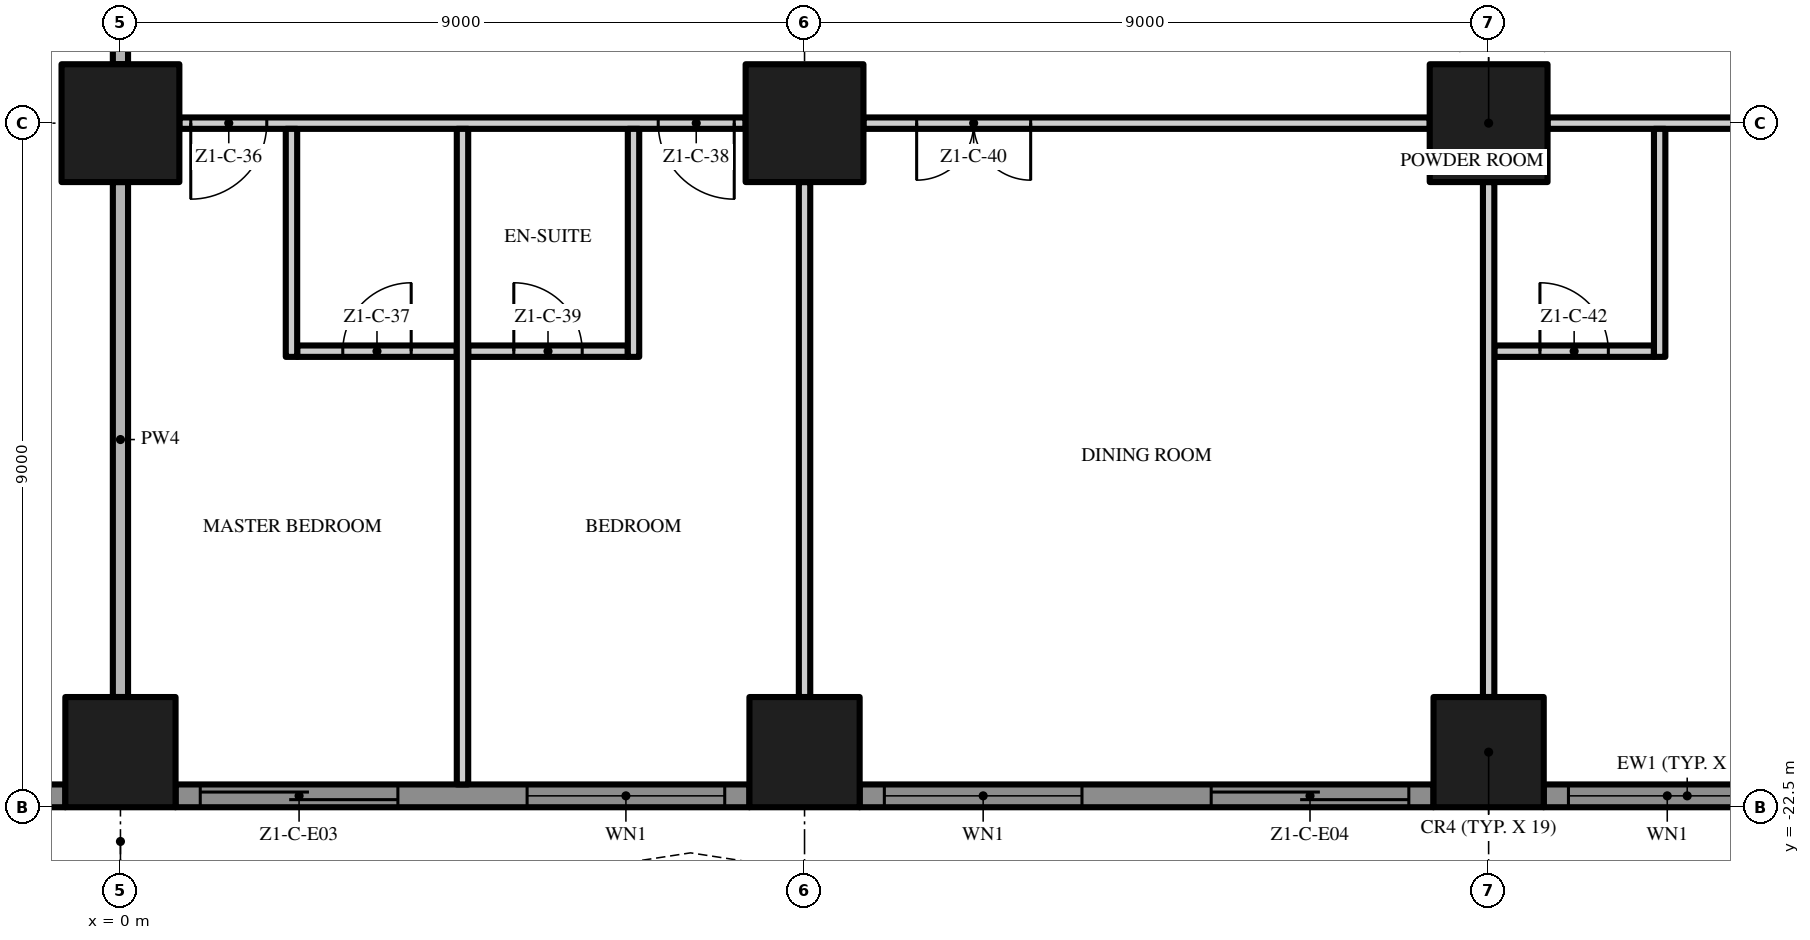
"""IFC4 building model, lengths in metres.
Left out: names, types, materials, properties, quantities, classifications, styles, units other than length and angle.
Written with IfcOpenShell. Run it as: python <this file> out.ifc"""

import sys

from ifc_helpers import new_model, si_unit, direction, frame, frame_2d, origin, origin_2d, place, context, subcontext, project, spatial, polyline, rectangle, outline, extrude, element, fill, save


model = new_model("IFC4")
c1 = context("Model", 3, precision=1e-05, world=origin(), true_north=direction((0.0, 1.0)))
c2 = subcontext(c1, "Body", "Model", "MODEL_VIEW")
j1 = project(units=[si_unit("LENGTHUNIT", "METRE"), si_unit("PLANEANGLEUNIT", "RADIAN")], contexts=[c1])
p1 = place(None, origin())
s1 = spatial("IfcSite", under=j1, at=p1, CompositionType="ELEMENT")
p2 = place(p1, origin())
s2 = spatial("IfcBuilding", under=s1, at=p2, CompositionType="ELEMENT")
p3 = place(p2, frame((0.0, 0.0, 37.8)))
s3 = spatial("IfcBuildingStorey", under=s2, at=p3, CompositionType="ELEMENT", Elevation=37.8)
p4 = place(p3, frame((0.0, -13.5, 0.0), z_axis=(0.0, 0.0, 1.0), x_axis=(1.0, 0.0, 0.0)))
e1 = element("IfcColumn", 1, at=p4, inside=s3, PredefinedType="COLUMN", context=c2, shape_type="SweptSolid", body=[
    extrude(rectangle(XDim=1.55, YDim=1.55, at=origin_2d()), origin(), (0.0, 0.0, 1.0), 3.5),
])
p5 = place(p3, frame((0.0, -21.775, 0.0), z_axis=(0.0, 0.0, 1.0), x_axis=(1.0, 0.0, 0.0)))
e2 = element("IfcColumn", 2, at=p5, inside=s3, PredefinedType="COLUMN", context=c2, shape_type="SweptSolid", body=[
    extrude(rectangle(XDim=1.45, YDim=1.45, at=origin_2d()), origin(), (0.0, 0.0, 1.0), 3.5),
])
p6 = place(p3, frame((18.0, -13.5, 0.0), z_axis=(0.0, 0.0, 1.0), x_axis=(1.0, 0.0, 0.0)))
e3 = element("IfcColumn", 3, at=p6, inside=s3, PredefinedType="COLUMN", context=c2, shape_type="SweptSolid", body=[
    extrude(rectangle(XDim=1.55, YDim=1.55, at=origin_2d()), origin(), (0.0, 0.0, 1.0), 3.5),
])
p7 = place(p3, frame((18.0, -21.775, 0.0), z_axis=(0.0, 0.0, 1.0), x_axis=(1.0, 0.0, 0.0)))
e4 = element("IfcColumn", 4, at=p7, inside=s3, PredefinedType="COLUMN", context=c2, shape_type="SweptSolid", body=[
    extrude(rectangle(XDim=1.45, YDim=1.45, at=origin_2d()), origin(), (0.0, 0.0, 1.0), 3.5),
])
p8 = place(p3, frame((9.0, -13.5, 0.0), z_axis=(0.0, 0.0, 1.0), x_axis=(1.0, 0.0, 0.0)))
e5 = element("IfcColumn", 5, at=p8, inside=s3, PredefinedType="COLUMN", context=c2, shape_type="SweptSolid", body=[
    extrude(rectangle(XDim=1.55, YDim=1.55, at=origin_2d()), origin(), (0.0, 0.0, 1.0), 3.5),
])
p9 = place(p3, frame((9.0, -21.775, 0.0), z_axis=(0.0, 0.0, 1.0), x_axis=(1.0, 0.0, 0.0)))
e6 = element("IfcColumn", 6, at=p9, inside=s3, PredefinedType="COLUMN", context=c2, shape_type="SweptSolid", body=[
    extrude(rectangle(XDim=1.45, YDim=1.45, at=origin_2d()), origin(), (0.0, 0.0, 1.0), 3.5),
])
p10 = place(p3, frame((-0.725, -22.35, 0.0), z_axis=(0.0, 0.0, 1.0), x_axis=(-1.0, 0.0, 0.0)))
e7 = element("IfcWall", 7, at=p10, inside=s3, PredefinedType="SOLIDWALL", context=c2, shape_type="SweptSolid", body=[
    extrude(rectangle(XDim=7.55, YDim=0.3, at=frame_2d((3.775, 0.0))), origin(), (0.0, 0.0, 1.0), 3.5),
])
p11 = place(p10, frame((4.625, 0.0, 0.45)))
e8 = element("IfcOpeningElement", 8, at=p11, cuts=e7, PredefinedType="OPENING", context=c2, shape_type="SweptSolid", body=[
    extrude(rectangle(XDim=2.6, YDim=2.65, at=frame_2d((1.3, 1.325))), frame((0.0, 0.16, 0.0), z_axis=(0.0, -1.0, 0.0), x_axis=(1.0, 0.0, 0.0)), (0.0, 0.0, 1.0), 0.32),
])
p12 = place(p10, frame((0.325, 0.0, 0.0)))
e9 = element("IfcOpeningElement", 9, at=p12, cuts=e7, PredefinedType="OPENING", context=c2, shape_type="SweptSolid", body=[
    extrude(rectangle(XDim=2.6, YDim=2.4, at=frame_2d((1.3, 1.2))), frame((0.0, 0.16, 0.0), z_axis=(0.0, -1.0, 0.0), x_axis=(1.0, 0.0, 0.0)), (0.0, 0.0, 1.0), 0.32),
])
p13 = place(p3, frame((8.275, -22.35, 0.0), z_axis=(0.0, 0.0, 1.0), x_axis=(-1.0, 0.0, 0.0)))
e10 = element("IfcWall", 10, at=p13, inside=s3, PredefinedType="SOLIDWALL", context=c2, shape_type="SweptSolid", body=[
    extrude(rectangle(XDim=7.55, YDim=0.3, at=frame_2d((3.775, 0.0))), origin(), (0.0, 0.0, 1.0), 3.5),
])
p14 = place(p13, frame((4.625, 0.0, 0.0)))
e11 = element("IfcOpeningElement", 11, at=p14, cuts=e10, PredefinedType="OPENING", context=c2, shape_type="SweptSolid", body=[
    extrude(rectangle(XDim=2.6, YDim=2.4, at=frame_2d((1.3, 1.2))), frame((0.0, 0.16, 0.0), z_axis=(0.0, -1.0, 0.0), x_axis=(1.0, 0.0, 0.0)), (0.0, 0.0, 1.0), 0.32),
])
p15 = place(p13, frame((0.325, 0.0, 0.45)))
e12 = element("IfcOpeningElement", 12, at=p15, cuts=e10, PredefinedType="OPENING", context=c2, shape_type="SweptSolid", body=[
    extrude(rectangle(XDim=2.6, YDim=2.65, at=frame_2d((1.3, 1.325))), frame((0.0, 0.16, 0.0), z_axis=(0.0, -1.0, 0.0), x_axis=(1.0, 0.0, 0.0)), (0.0, 0.0, 1.0), 0.32),
])
p16 = place(p3, frame((17.275, -22.35, 0.0), z_axis=(0.0, 0.0, 1.0), x_axis=(-1.0, 0.0, 0.0)))
e13 = element("IfcWall", 13, at=p16, inside=s3, PredefinedType="SOLIDWALL", context=c2, shape_type="SweptSolid", body=[
    extrude(rectangle(XDim=7.55, YDim=0.3, at=frame_2d((3.775, 0.0))), origin(), (0.0, 0.0, 1.0), 3.5),
])
p17 = place(p16, frame((4.625, 0.0, 0.45)))
e14 = element("IfcOpeningElement", 14, at=p17, cuts=e13, PredefinedType="OPENING", context=c2, shape_type="SweptSolid", body=[
    extrude(rectangle(XDim=2.6, YDim=2.65, at=frame_2d((1.3, 1.325))), frame((0.0, 0.16, 0.0), z_axis=(0.0, -1.0, 0.0), x_axis=(1.0, 0.0, 0.0)), (0.0, 0.0, 1.0), 0.32),
])
p18 = place(p16, frame((0.325, 0.0, 0.0)))
e15 = element("IfcOpeningElement", 15, at=p18, cuts=e13, PredefinedType="OPENING", context=c2, shape_type="SweptSolid", body=[
    extrude(rectangle(XDim=2.6, YDim=2.4, at=frame_2d((1.3, 1.2))), frame((0.0, 0.16, 0.0), z_axis=(0.0, -1.0, 0.0), x_axis=(1.0, 0.0, 0.0)), (0.0, 0.0, 1.0), 0.32),
])
p19 = place(p3, frame((22.5, -22.35, 0.0), z_axis=(0.0, 0.0, 1.0), x_axis=(-1.0, 0.0, 0.0)))
e16 = element("IfcWall", 16, at=p19, inside=s3, PredefinedType="SOLIDWALL", context=c2, shape_type="SweptSolid", body=[
    extrude(rectangle(XDim=3.775, YDim=0.3, at=frame_2d((1.887, 0.0))), origin(), (0.0, 0.0, 1.0), 3.5),
])
p20 = place(p19, frame((0.85, 0.0, 0.45)))
e17 = element("IfcOpeningElement", 17, at=p20, cuts=e16, PredefinedType="OPENING", context=c2, shape_type="SweptSolid", body=[
    extrude(rectangle(XDim=2.6, YDim=2.65, at=frame_2d((1.3, 1.325))), frame((0.0, 0.16, 0.0), z_axis=(0.0, -1.0, 0.0), x_axis=(1.0, 0.0, 0.0)), (0.0, 0.0, 1.0), 0.32),
])
p21 = place(p3, origin())
e18 = element("IfcWall", 18, at=p21, inside=s3, PredefinedType="USERDEFINED", context=c2, shape_type="SweptSolid", body=[
    extrude(outline(polyline([(-22.5, -23.1), (-21.0, -23.329), (-19.5, -23.929), (-18.0, -24.671), (-16.5, -25.271), (-15.0, -25.5), (-13.5, -25.271), (-12.0, -24.671), (-10.5, -23.929), (-9.0, -23.329), (-7.5, -23.1), (-6.0, -23.329), (-4.5, -23.929), (-3.0, -24.671), (-1.5, -25.271), (0.0, -25.5), (1.5, -25.271), (3.0, -24.671), (4.5, -23.929), (6.0, -23.329), (7.5, -23.1), (9.0, -23.329), (10.5, -23.929), (12.0, -24.671), (13.5, -25.271), (15.0, -25.5), (16.5, -25.271), (18.0, -24.671), (19.5, -23.929), (21.0, -23.329), (22.5, -23.1), (22.462, -22.853), (20.934, -23.086), (19.398, -23.701), (17.898, -24.442), (16.434, -25.028), (15.0, -25.247), (13.566, -25.028), (12.102, -24.442), (10.602, -23.701), (9.066, -23.086), (7.5, -22.847), (5.934, -23.086), (4.398, -23.701), (2.898, -24.442), (1.434, -25.028), (0.0, -25.247), (-1.434, -25.028), (-2.898, -24.442), (-4.398, -23.701), (-5.934, -23.086), (-7.5, -22.847), (-9.066, -23.086), (-10.602, -23.701), (-12.102, -24.442), (-13.566, -25.028), (-15.0, -25.247), (-16.434, -25.028), (-17.898, -24.442), (-19.398, -23.701), (-20.934, -23.086), (-22.462, -22.853), (-22.5, -23.1)])), origin(), (0.0, 0.0, 1.0), 0.9),
])
p22 = place(p3, frame((2.325, -16.5, 0.0), z_axis=(0.0, 0.0, 1.0), x_axis=(1.0, 0.0, 0.0)))
e19 = element("IfcWall", 19, at=p22, inside=s3, PredefinedType="PARTITIONING", context=c2, shape_type="SweptSolid", body=[
    extrude(rectangle(XDim=2.1, YDim=0.15, at=frame_2d((1.05, 0.0))), origin(), (0.0, 0.0, 1.0), 3.5),
])
p23 = place(p22, frame((0.6, 0.0, 0.0)))
e20 = element("IfcOpeningElement", 20, at=p23, cuts=e19, PredefinedType="OPENING", context=c2, shape_type="SweptSolid", body=[
    extrude(rectangle(XDim=0.9, YDim=2.1, at=frame_2d((0.45, 1.05))), frame((0.0, 0.085, 0.0), z_axis=(0.0, -1.0, 0.0), x_axis=(1.0, 0.0, 0.0)), (0.0, 0.0, 1.0), 0.17),
])
p24 = place(p3, frame((4.575, -16.5, 0.0), z_axis=(0.0, 0.0, 1.0), x_axis=(1.0, 0.0, 0.0)))
e21 = element("IfcWall", 21, at=p24, inside=s3, PredefinedType="PARTITIONING", context=c2, shape_type="SweptSolid", body=[
    extrude(rectangle(XDim=2.1, YDim=0.15, at=frame_2d((1.05, 0.0))), origin(), (0.0, 0.0, 1.0), 3.5),
])
p25 = place(p24, frame((0.6, 0.0, 0.0)))
e22 = element("IfcOpeningElement", 22, at=p25, cuts=e21, PredefinedType="OPENING", context=c2, shape_type="SweptSolid", body=[
    extrude(rectangle(XDim=0.9, YDim=2.1, at=frame_2d((0.45, 1.05))), frame((0.0, 0.085, 0.0), z_axis=(0.0, -1.0, 0.0), x_axis=(1.0, 0.0, 0.0)), (0.0, 0.0, 1.0), 0.17),
])
p26 = place(p3, frame((18.075, -16.5, 0.0), z_axis=(0.0, 0.0, 1.0), x_axis=(1.0, 0.0, 0.0)))
e23 = element("IfcWall", 23, at=p26, inside=s3, PredefinedType="PARTITIONING", context=c2, shape_type="SweptSolid", body=[
    extrude(rectangle(XDim=2.1, YDim=0.15, at=frame_2d((1.05, 0.0))), origin(), (0.0, 0.0, 1.0), 3.5),
])
p27 = place(p26, frame((0.6, 0.0, 0.0)))
e24 = element("IfcOpeningElement", 24, at=p27, cuts=e23, PredefinedType="OPENING", context=c2, shape_type="SweptSolid", body=[
    extrude(rectangle(XDim=0.9, YDim=2.1, at=frame_2d((0.45, 1.05))), frame((0.0, 0.085, 0.0), z_axis=(0.0, -1.0, 0.0), x_axis=(1.0, 0.0, 0.0)), (0.0, 0.0, 1.0), 0.17),
])
p28 = place(p3, frame((8.225, -13.5, 0.0), z_axis=(0.0, 0.0, 1.0), x_axis=(-1.0, 0.0, 0.0)))
e25 = element("IfcWall", 25, at=p28, inside=s3, PredefinedType="PARTITIONING", context=c2, shape_type="SweptSolid", body=[
    extrude(rectangle(XDim=7.45, YDim=0.15, at=frame_2d((3.725, 0.0))), origin(), (0.0, 0.0, 1.0), 3.5),
])
p29 = place(p28, frame((6.3, 0.0, 0.0)))
e26 = element("IfcOpeningElement", 26, at=p29, cuts=e25, PredefinedType="OPENING", context=c2, shape_type="SweptSolid", body=[
    extrude(rectangle(XDim=1.0, YDim=2.4, at=frame_2d((0.5, 1.2))), frame((0.0, 0.085, 0.0), z_axis=(0.0, -1.0, 0.0), x_axis=(1.0, 0.0, 0.0)), (0.0, 0.0, 1.0), 0.17),
])
p30 = place(p28, frame((0.15, 0.0, 0.0)))
e27 = element("IfcOpeningElement", 27, at=p30, cuts=e25, PredefinedType="OPENING", context=c2, shape_type="SweptSolid", body=[
    extrude(rectangle(XDim=1.0, YDim=2.4, at=frame_2d((0.5, 1.2))), frame((0.0, 0.085, 0.0), z_axis=(0.0, -1.0, 0.0), x_axis=(1.0, 0.0, 0.0)), (0.0, 0.0, 1.0), 0.17),
])
p31 = place(p3, frame((17.225, -13.5, 0.0), z_axis=(0.0, 0.0, 1.0), x_axis=(-1.0, 0.0, 0.0)))
e28 = element("IfcWall", 28, at=p31, inside=s3, PredefinedType="PARTITIONING", context=c2, shape_type="SweptSolid", body=[
    extrude(rectangle(XDim=7.45, YDim=0.15, at=frame_2d((3.725, 0.0))), origin(), (0.0, 0.0, 1.0), 3.5),
])
p32 = place(p31, frame((5.25, 0.0, 0.0)))
e29 = element("IfcOpeningElement", 29, at=p32, cuts=e28, PredefinedType="OPENING", context=c2, shape_type="SweptSolid", body=[
    extrude(rectangle(XDim=1.5, YDim=2.4, at=frame_2d((0.75, 1.2))), frame((0.0, 0.085, 0.0), z_axis=(0.0, -1.0, 0.0), x_axis=(1.0, 0.0, 0.0)), (0.0, 0.0, 1.0), 0.17),
])
p33 = place(p3, frame((25.55, -13.5, 0.0), z_axis=(0.0, 0.0, 1.0), x_axis=(-1.0, 0.0, 0.0)))
e30 = element("IfcWall", 30, at=p33, inside=s3, PredefinedType="PARTITIONING", context=c2, shape_type="SweptSolid", body=[
    extrude(rectangle(XDim=6.775, YDim=0.15, at=frame_2d((3.388, 0.0))), origin(), (0.0, 0.0, 1.0), 3.5),
])
p34 = place(p33, frame((1.05, 0.0, 0.0)))
e31 = element("IfcOpeningElement", 31, at=p34, cuts=e30, PredefinedType="OPENING", context=c2, shape_type="SweptSolid", body=[
    extrude(rectangle(XDim=1.8, YDim=2.4, at=frame_2d((0.9, 1.2))), frame((0.0, 0.085, 0.0), z_axis=(0.0, -1.0, 0.0), x_axis=(1.0, 0.0, 0.0)), (0.0, 0.0, 1.0), 0.17),
])
p35 = place(p3, frame((0.0, -21.05, 0.0), z_axis=(0.0, 0.0, 1.0), x_axis=(0.0, 1.0, 0.0)))
e32 = element("IfcWall", 32, at=p35, inside=s3, PredefinedType="PARTITIONING", context=c2, shape_type="SweptSolid", body=[
    extrude(rectangle(XDim=6.775, YDim=0.2, at=frame_2d((3.388, 0.0))), origin(), (0.0, 0.0, 1.0), 3.5),
])
p36 = place(p3, frame((0.0, -12.725, 0.0), z_axis=(0.0, 0.0, 1.0), x_axis=(0.0, 1.0, 0.0)))
e33 = element("IfcWall", 33, at=p36, inside=s3, PredefinedType="PARTITIONING", context=c2, shape_type="SweptSolid", body=[
    extrude(rectangle(XDim=7.45, YDim=0.2, at=frame_2d((3.725, 0.0))), origin(), (0.0, 0.0, 1.0), 3.5),
])
p37 = place(p3, frame((2.25, -16.575, 0.0), z_axis=(0.0, 0.0, 1.0), x_axis=(0.0, 1.0, 0.0)))
e34 = element("IfcWall", 34, at=p37, inside=s3, PredefinedType="PARTITIONING", context=c2, shape_type="SweptSolid", body=[
    extrude(rectangle(XDim=3.0, YDim=0.15, at=frame_2d((1.5, 0.0))), origin(), (0.0, 0.0, 1.0), 3.5),
])
p38 = place(p3, frame((4.5, -22.2, 0.0), z_axis=(0.0, 0.0, 1.0), x_axis=(0.0, 1.0, 0.0)))
e35 = element("IfcWall", 35, at=p38, inside=s3, PredefinedType="PARTITIONING", context=c2, shape_type="SweptSolid", body=[
    extrude(rectangle(XDim=8.625, YDim=0.15, at=frame_2d((4.312, 0.0))), origin(), (0.0, 0.0, 1.0), 3.5),
])
p39 = place(p3, frame((6.75, -16.575, 0.0), z_axis=(0.0, 0.0, 1.0), x_axis=(0.0, 1.0, 0.0)))
e36 = element("IfcWall", 36, at=p39, inside=s3, PredefinedType="PARTITIONING", context=c2, shape_type="SweptSolid", body=[
    extrude(rectangle(XDim=3.0, YDim=0.15, at=frame_2d((1.5, 0.0))), origin(), (0.0, 0.0, 1.0), 3.5),
])
for number, where, z_axis, x_axis in (
    (37, (9.0, -21.05, 0.0), (0.0, 0.0, 1.0), (0.0, 1.0, 0.0)),
    (38, (18.0, -21.05, 0.0), (0.0, 0.0, 1.0), (0.0, 1.0, 0.0)),
):
    element("IfcWall", number, at=place(p3, frame(where, z_axis=z_axis, x_axis=x_axis)), inside=s3, PredefinedType="PARTITIONING", context=c2, shape_type="SweptSolid", body=[
        extrude(rectangle(XDim=6.775, YDim=0.15, at=frame_2d((3.388, 0.0))), origin(), (0.0, 0.0, 1.0), 3.5),
    ])
p40 = place(p3, frame((20.25, -16.575, 0.0), z_axis=(0.0, 0.0, 1.0), x_axis=(0.0, 1.0, 0.0)))
e39 = element("IfcWall", 39, at=p40, inside=s3, PredefinedType="PARTITIONING", context=c2, shape_type="SweptSolid", body=[
    extrude(rectangle(XDim=3.0, YDim=0.15, at=frame_2d((1.5, 0.0))), origin(), (0.0, 0.0, 1.0), 3.5),
])
p41 = place(p14, origin())
e40 = element("IfcDoor", 40, at=p41, inside=s3, OperationType="SINGLE_SWING_LEFT", PredefinedType="DOOR", context=c2, shape_type="SweptSolid", body=[
    extrude(rectangle(XDim=2.6, YDim=2.4, at=frame_2d((1.3, 1.2))), frame((0.0, 0.025, 0.0), z_axis=(0.0, -1.0, 0.0), x_axis=(1.0, 0.0, 0.0)), (0.0, 0.0, 1.0), 0.05),
])
fill(e11, e40)
p42 = place(p15, origin())
e41 = element("IfcWindow", 41, at=p42, inside=s3, PartitioningType="SINGLE_PANEL", PredefinedType="WINDOW", context=c2, shape_type="SweptSolid", body=[
    extrude(rectangle(XDim=2.6, YDim=2.65, at=frame_2d((1.3, 1.325))), frame((0.0, 0.03, 0.0), z_axis=(0.0, -1.0, 0.0), x_axis=(1.0, 0.0, 0.0)), (0.0, 0.0, 1.0), 0.06),
])
fill(e12, e41)
p43 = place(p17, origin())
e42 = element("IfcWindow", 42, at=p43, inside=s3, PartitioningType="SINGLE_PANEL", PredefinedType="WINDOW", context=c2, shape_type="SweptSolid", body=[
    extrude(rectangle(XDim=2.6, YDim=2.65, at=frame_2d((1.3, 1.325))), frame((0.0, 0.03, 0.0), z_axis=(0.0, -1.0, 0.0), x_axis=(1.0, 0.0, 0.0)), (0.0, 0.0, 1.0), 0.06),
])
fill(e14, e42)
p44 = place(p18, origin())
e43 = element("IfcDoor", 43, at=p44, inside=s3, OperationType="SINGLE_SWING_LEFT", PredefinedType="DOOR", context=c2, shape_type="SweptSolid", body=[
    extrude(rectangle(XDim=2.6, YDim=2.4, at=frame_2d((1.3, 1.2))), frame((0.0, 0.025, 0.0), z_axis=(0.0, -1.0, 0.0), x_axis=(1.0, 0.0, 0.0)), (0.0, 0.0, 1.0), 0.05),
])
fill(e15, e43)
p45 = place(p20, origin())
e44 = element("IfcWindow", 44, at=p45, inside=s3, PartitioningType="SINGLE_PANEL", PredefinedType="WINDOW", context=c2, shape_type="SweptSolid", body=[
    extrude(rectangle(XDim=2.6, YDim=2.65, at=frame_2d((1.3, 1.325))), frame((0.0, 0.03, 0.0), z_axis=(0.0, -1.0, 0.0), x_axis=(1.0, 0.0, 0.0)), (0.0, 0.0, 1.0), 0.06),
])
fill(e17, e44)
p46 = place(p29, origin())
e45 = element("IfcDoor", 45, at=p46, inside=s3, OperationType="SINGLE_SWING_RIGHT", PredefinedType="DOOR", context=c2, shape_type="SweptSolid", body=[
    extrude(rectangle(XDim=1.0, YDim=2.4, at=frame_2d((0.5, 1.2))), frame((0.0, 0.025, 0.0), z_axis=(0.0, -1.0, 0.0), x_axis=(1.0, 0.0, 0.0)), (0.0, 0.0, 1.0), 0.05),
])
fill(e26, e45)
p47 = place(p23, origin())
e46 = element("IfcDoor", 46, at=p47, inside=s3, OperationType="SINGLE_SWING_RIGHT", PredefinedType="DOOR", context=c2, shape_type="SweptSolid", body=[
    extrude(rectangle(XDim=0.9, YDim=2.1, at=frame_2d((0.45, 1.05))), frame((0.0, 0.025, 0.0), z_axis=(0.0, -1.0, 0.0), x_axis=(1.0, 0.0, 0.0)), (0.0, 0.0, 1.0), 0.05),
])
fill(e20, e46)
p48 = place(p30, origin())
e47 = element("IfcDoor", 47, at=p48, inside=s3, OperationType="SINGLE_SWING_LEFT", PredefinedType="DOOR", context=c2, shape_type="SweptSolid", body=[
    extrude(rectangle(XDim=1.0, YDim=2.4, at=frame_2d((0.5, 1.2))), frame((0.0, 0.025, 0.0), z_axis=(0.0, -1.0, 0.0), x_axis=(1.0, 0.0, 0.0)), (0.0, 0.0, 1.0), 0.05),
])
fill(e27, e47)
p49 = place(p25, origin())
e48 = element("IfcDoor", 48, at=p49, inside=s3, OperationType="SINGLE_SWING_LEFT", PredefinedType="DOOR", context=c2, shape_type="SweptSolid", body=[
    extrude(rectangle(XDim=0.9, YDim=2.1, at=frame_2d((0.45, 1.05))), frame((0.0, 0.025, 0.0), z_axis=(0.0, -1.0, 0.0), x_axis=(1.0, 0.0, 0.0)), (0.0, 0.0, 1.0), 0.05),
])
fill(e22, e48)
p50 = place(p32, origin())
e49 = element("IfcDoor", 49, at=p50, inside=s3, OperationType="DOUBLE_DOOR_SINGLE_SWING", PredefinedType="DOOR", context=c2, shape_type="SweptSolid", body=[
    extrude(rectangle(XDim=1.5, YDim=2.4, at=frame_2d((0.75, 1.2))), frame((0.0, 0.025, 0.0), z_axis=(0.0, -1.0, 0.0), x_axis=(1.0, 0.0, 0.0)), (0.0, 0.0, 1.0), 0.05),
])
fill(e29, e49)
p51 = place(p27, origin())
e50 = element("IfcDoor", 50, at=p51, inside=s3, OperationType="SINGLE_SWING_LEFT", PredefinedType="DOOR", context=c2, shape_type="SweptSolid", body=[
    extrude(rectangle(XDim=0.9, YDim=2.1, at=frame_2d((0.45, 1.05))), frame((0.0, 0.025, 0.0), z_axis=(0.0, -1.0, 0.0), x_axis=(1.0, 0.0, 0.0)), (0.0, 0.0, 1.0), 0.05),
])
fill(e24, e50)
save(model, sys.argv[1])
